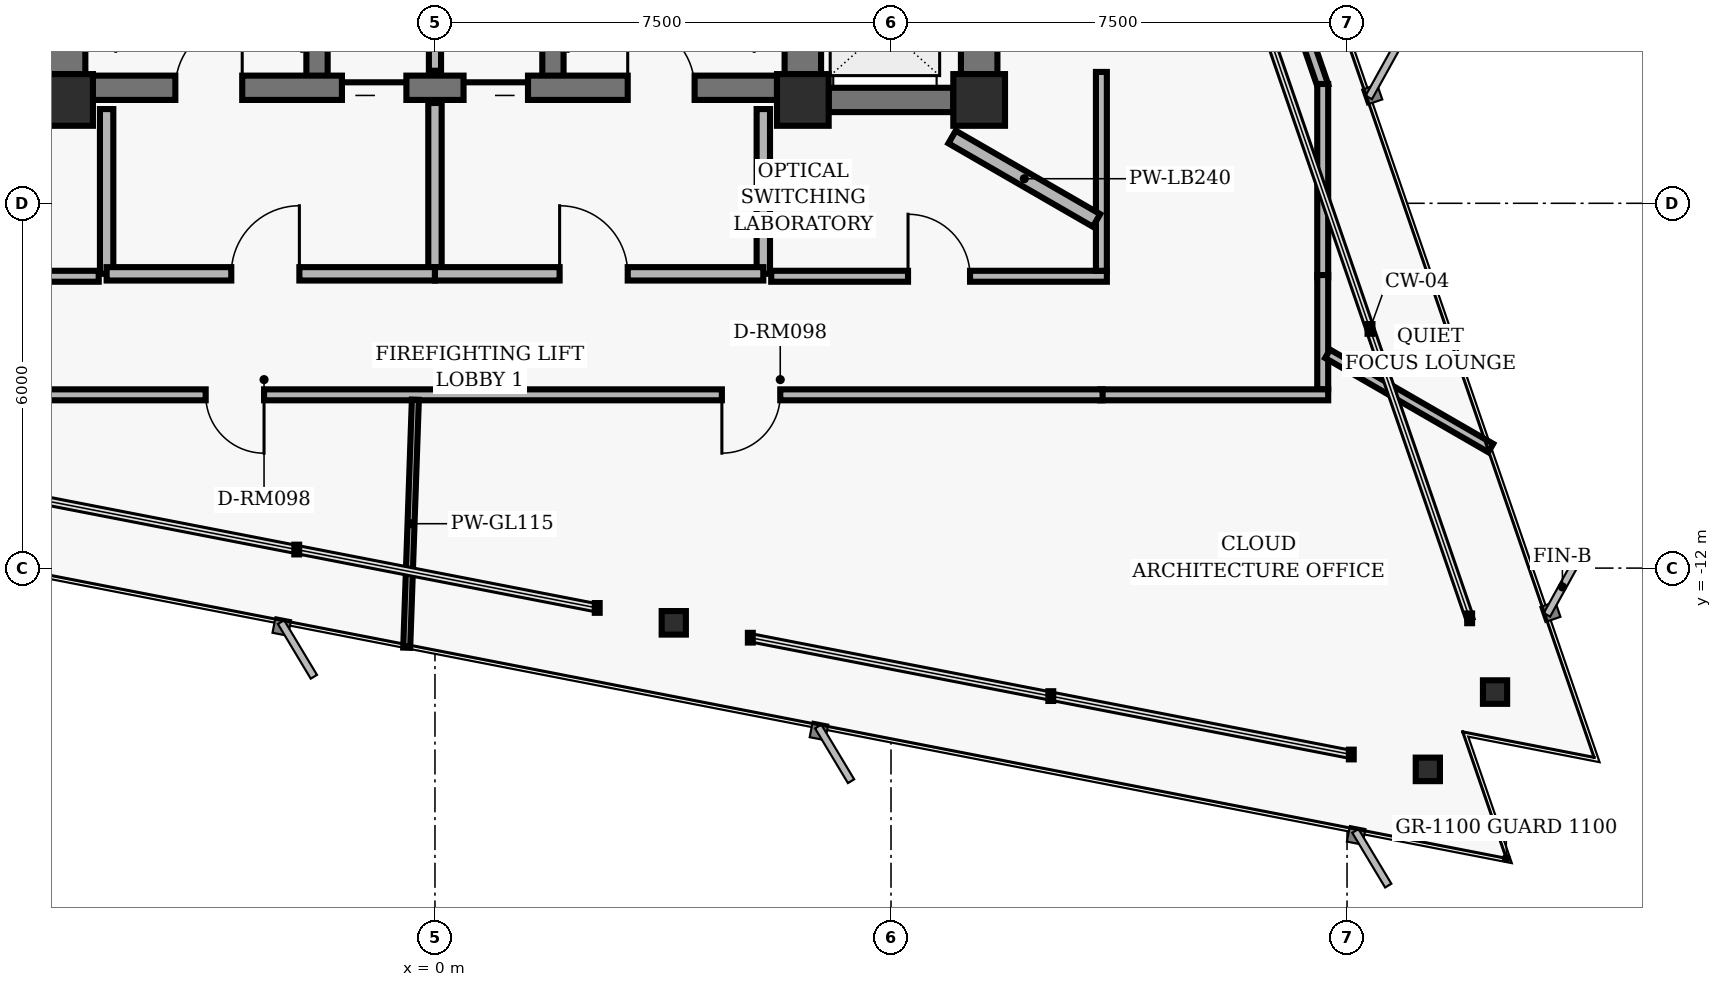
"""IFC4 building model, lengths in metres.
Left out: names, types, materials, properties, quantities, classifications, styles, units other than length and angle.
Written with IfcOpenShell. Run it as: python <this file> out.ifc"""

import sys

from ifc_helpers import new_model, si_unit, direction, frame, frame_2d, origin, origin_2d, place, context, subcontext, project, spatial, rectangle, hollow_rectangle, i_section, extrude, element, fill, save


model = new_model("IFC4")
c1 = context("Model", 3, precision=1e-05, world=origin(), true_north=direction((0.0, 1.0)))
c2 = subcontext(c1, "Body", "Model", "MODEL_VIEW")
j1 = project(units=[si_unit("LENGTHUNIT", "METRE"), si_unit("PLANEANGLEUNIT", "RADIAN")], contexts=[c1])
p1 = place(None, origin())
s1 = spatial("IfcSite", under=j1, at=p1, CompositionType="ELEMENT")
p2 = place(p1, origin())
s2 = spatial("IfcBuilding", under=s1, at=p2, CompositionType="ELEMENT")
p3 = place(p2, frame((0.0, 0.0, 162.4)))
s3 = spatial("IfcBuildingStorey", under=s2, at=p3, CompositionType="ELEMENT", Elevation=162.4)
for number, where, z_axis, x_axis in (
    (1, (-6.05, -4.3, 0.0), (0.0, 0.0, 1.0), (1.0, 0.0, 0.0)),
    (2, (6.05, -4.3, 0.0), (0.0, 0.0, 1.0), (1.0, 0.0, 0.0)),
    (3, (8.95, -4.3, 0.0), (0.0, 0.0, 1.0), (1.0, 0.0, 0.0)),
):
    element("IfcColumn", number, at=place(p3, frame(where, z_axis=z_axis, x_axis=x_axis)), inside=s3, PredefinedType="COLUMN", context=c2, shape_type="SweptSolid", body=[
        extrude(hollow_rectangle(XDim=0.85, YDim=0.85, WallThickness=0.055, InnerFilletRadius=0.02, OuterFilletRadius=0.04, at=origin_2d()), origin(), (0.0, 0.0, 1.0), 3.04),
    ])
for number, where, z_axis, x_axis in (
    (4, (-6.05, -3.875, 0.0), (0.0, 0.0, 1.0), (0.0, 1.0, 0.0)),
    (5, (6.05, -3.875, 0.0), (0.0, 0.0, 1.0), (0.0, 1.0, 0.0)),
):
    element("IfcWall", number, at=place(p3, frame(where, z_axis=z_axis, x_axis=x_axis)), inside=s3, PredefinedType="SHEAR", context=c2, shape_type="SweptSolid", body=[
        extrude(rectangle(XDim=3.45, YDim=0.6, at=frame_2d((1.725, 0.0))), origin(), (0.0, 0.0, 1.0), 2.788),
    ])
for number, where, z_axis, x_axis in (
    (6, (-1.94, -4.1, 0.0), (0.0, 0.0, 1.0), (0.0, 1.0, 0.0)),
    (7, (1.94, -4.1, 0.0), (0.0, 0.0, 1.0), (0.0, 1.0, 0.0)),
):
    element("IfcWall", number, at=place(p3, frame(where, z_axis=z_axis, x_axis=x_axis)), inside=s3, PredefinedType="SHEAR", context=c2, shape_type="SweptSolid", body=[
        extrude(rectangle(XDim=8.2, YDim=0.35, at=frame_2d((4.1, 0.0))), origin(), (0.0, 0.0, 1.0), 2.788),
    ])
p4 = place(p3, frame((-5.625, -4.1, 0.0), z_axis=(0.0, 0.0, 1.0), x_axis=(1.0, 0.0, 0.0)))
e8 = element("IfcWall", 8, at=p4, inside=s3, PredefinedType="SHEAR", context=c2, shape_type="SweptSolid", body=[
    extrude(rectangle(XDim=11.25, YDim=0.4, at=frame_2d((5.625, 0.0))), origin(), (0.0, 0.0, 1.0), 2.788),
])
p5 = place(p4, frame((1.355, 0.0, 0.0)))
e9 = element("IfcOpeningElement", 9, at=p5, cuts=e8, PredefinedType="OPENING", context=c2, shape_type="SweptSolid", body=[
    extrude(rectangle(XDim=1.1, YDim=2.04, at=frame_2d((0.55, 1.02))), frame((0.0, 0.21, 0.0), z_axis=(0.0, -1.0, 0.0), x_axis=(1.0, 0.0, 0.0)), (0.0, 0.0, 1.0), 0.42),
])
p6 = place(p4, frame((8.795, 0.0, 0.0)))
e10 = element("IfcOpeningElement", 10, at=p6, cuts=e8, PredefinedType="OPENING", context=c2, shape_type="SweptSolid", body=[
    extrude(rectangle(XDim=1.1, YDim=2.04, at=frame_2d((0.55, 1.02))), frame((0.0, 0.21, 0.0), z_axis=(0.0, -1.0, 0.0), x_axis=(1.0, 0.0, 0.0)), (0.0, 0.0, 1.0), 0.42),
])
p7 = place(p4, frame((4.095, 0.0, 0.0)))
e11 = element("IfcOpeningElement", 11, at=p7, cuts=e8, PredefinedType="OPENING", context=c2, shape_type="SweptSolid", body=[
    extrude(rectangle(XDim=1.06, YDim=2.04, at=frame_2d((0.53, 1.02))), frame((0.0, 0.21, 0.0), z_axis=(0.0, -1.0, 0.0), x_axis=(1.0, 0.0, 0.0)), (0.0, 0.0, 1.0), 0.42),
])
p8 = place(p4, frame((6.095, 0.0, 0.0)))
e12 = element("IfcOpeningElement", 12, at=p8, cuts=e8, PredefinedType="OPENING", context=c2, shape_type="SweptSolid", body=[
    extrude(rectangle(XDim=1.06, YDim=2.04, at=frame_2d((0.53, 1.02))), frame((0.0, 0.21, 0.0), z_axis=(0.0, -1.0, 0.0), x_axis=(1.0, 0.0, 0.0)), (0.0, 0.0, 1.0), 0.42),
])
p9 = place(p3, frame((8.95, -3.875, 0.0), z_axis=(0.0, 0.0, 1.0), x_axis=(0.0, 1.0, 0.0)))
e13 = element("IfcWall", 13, at=p9, inside=s3, PredefinedType="SHEAR", context=c2, shape_type="SweptSolid", body=[
    extrude(rectangle(XDim=7.95, YDim=0.6, at=frame_2d((3.975, 0.0))), origin(), (0.0, 0.0, 1.0), 2.788),
])
p10 = place(p9, frame((0.55, 0.0, 0.0)))
e14 = element("IfcOpeningElement", 14, at=p10, cuts=e13, PredefinedType="OPENING", context=c2, shape_type="SweptSolid", body=[
    extrude(rectangle(XDim=1.06, YDim=2.04, at=frame_2d((0.53, 1.02))), frame((0.0, 0.31, 0.0), z_axis=(0.0, -1.0, 0.0), x_axis=(1.0, 0.0, 0.0)), (0.0, 0.0, 1.0), 0.62),
])
p11 = place(p9, frame((3.445, 0.0, 0.0)))
e15 = element("IfcOpeningElement", 15, at=p11, cuts=e13, PredefinedType="OPENING", context=c2, shape_type="SweptSolid", body=[
    extrude(rectangle(XDim=1.06, YDim=2.04, at=frame_2d((0.53, 1.02))), frame((0.0, 0.31, 0.0), z_axis=(0.0, -1.0, 0.0), x_axis=(1.0, 0.0, 0.0)), (0.0, 0.0, 1.0), 0.62),
])
p12 = place(p9, frame((6.33, 0.0, 0.0)))
e16 = element("IfcOpeningElement", 16, at=p12, cuts=e13, PredefinedType="OPENING", context=c2, shape_type="SweptSolid", body=[
    extrude(rectangle(XDim=1.06, YDim=2.04, at=frame_2d((0.53, 1.02))), frame((0.0, 0.31, 0.0), z_axis=(0.0, -1.0, 0.0), x_axis=(1.0, 0.0, 0.0)), (0.0, 0.0, 1.0), 0.62),
])
p13 = place(p3, frame((6.475, -4.3, 0.0), z_axis=(0.0, 0.0, 1.0), x_axis=(1.0, 0.0, 0.0)))
e17 = element("IfcWall", 17, at=p13, inside=s3, PredefinedType="SHEAR", context=c2, shape_type="SweptSolid", body=[
    extrude(rectangle(XDim=2.05, YDim=0.4, at=frame_2d((1.025, 0.0))), origin(), (0.0, 0.0, 1.0), 2.788),
])
for number, where, z_axis, x_axis in (
    (18, (17.434, -14.039, 0.0), (0.0, 0.0, 1.0), (1.0, 0.0, 0.0)),
    (19, (3.927, -12.9, 0.0), (0.0, 0.0, 1.0), (1.0, 0.0, 0.0)),
    (20, (16.329, -15.311, 0.0), (0.0, 0.0, 1.0), (1.0, 0.0, 0.0)),
):
    element("IfcColumn", number, at=place(p3, frame(where, z_axis=z_axis, x_axis=x_axis)), inside=s3, PredefinedType="COLUMN", context=c2, shape_type="SweptSolid", body=[
        extrude(i_section(OverallWidth=0.398, OverallDepth=0.387, WebThickness=0.021, FlangeThickness=0.033, FilletRadius=0.018, at=origin_2d()), origin(), (0.0, 0.0, 1.0), 3.04),
    ])
p14 = place(p3, frame((0.0, -3.82, 0.0), z_axis=(0.0, 0.0, 1.0), x_axis=(0.0, 1.0, 0.0)))
e21 = element("IfcWall", 21, at=p14, inside=s3, PredefinedType="PARTITIONING", context=c2, shape_type="SweptSolid", body=[
    extrude(rectangle(XDim=2.67, YDim=0.2, at=frame_2d((1.335, 0.0))), origin(), (0.0, 0.0, 1.0), 2.763),
])
for number, where, z_axis, x_axis in (
    (22, (-5.4, -7.16, 0.0), (0.0, 0.0, 1.0), (0.0, 1.0, 0.0)),
    (23, (5.4, -7.16, 0.0), (0.0, 0.0, 1.0), (0.0, 1.0, 0.0)),
):
    element("IfcWall", number, at=place(p3, frame(where, z_axis=z_axis, x_axis=x_axis)), inside=s3, PredefinedType="PARTITIONING", context=c2, shape_type="SweptSolid", body=[
        extrude(rectangle(XDim=2.71, YDim=0.22, at=frame_2d((1.355, 0.0))), origin(), (0.0, 0.0, 1.0), 2.763),
    ])
p15 = place(p3, frame((0.0, -7.16, 0.0), z_axis=(0.0, 0.0, 1.0), x_axis=(0.0, 1.0, 0.0)))
e24 = element("IfcWall", 24, at=p15, inside=s3, PredefinedType="PARTITIONING", context=c2, shape_type="SweptSolid", body=[
    extrude(rectangle(XDim=2.81, YDim=0.22, at=frame_2d((1.405, 0.0))), origin(), (0.0, 0.0, 1.0), 2.763),
])
p16 = place(p3, frame((-5.4, -7.16, 0.0), z_axis=(0.0, 0.0, 1.0), x_axis=(1.0, 0.0, 0.0)))
e25 = element("IfcWall", 25, at=p16, inside=s3, PredefinedType="PARTITIONING", context=c2, shape_type="SweptSolid", body=[
    extrude(rectangle(XDim=5.4, YDim=0.22, at=frame_2d((2.7, 0.0))), origin(), (0.0, 0.0, 1.0), 2.33),
])
p17 = place(p16, frame((2.05, 0.0, 0.0)))
e26 = element("IfcOpeningElement", 26, at=p17, cuts=e25, PredefinedType="OPENING", context=c2, shape_type="SweptSolid", body=[
    extrude(rectangle(XDim=1.12, YDim=2.02, at=frame_2d((0.56, 1.01))), frame((0.0, 0.12, 0.0), z_axis=(0.0, -1.0, 0.0), x_axis=(1.0, 0.0, 0.0)), (0.0, 0.0, 1.0), 0.24),
])
p18 = place(p3, frame((0.0, -7.16, 0.0), z_axis=(0.0, 0.0, 1.0), x_axis=(1.0, 0.0, 0.0)))
e27 = element("IfcWall", 27, at=p18, inside=s3, PredefinedType="PARTITIONING", context=c2, shape_type="SweptSolid", body=[
    extrude(rectangle(XDim=5.4, YDim=0.22, at=frame_2d((2.7, 0.0))), origin(), (0.0, 0.0, 1.0), 2.33),
])
p19 = place(p18, frame((2.05, 0.0, 0.0)))
e28 = element("IfcOpeningElement", 28, at=p19, cuts=e27, PredefinedType="OPENING", context=c2, shape_type="SweptSolid", body=[
    extrude(rectangle(XDim=1.12, YDim=2.02, at=frame_2d((0.56, 1.01))), frame((0.0, 0.12, 0.0), z_axis=(0.0, -1.0, 0.0), x_axis=(1.0, 0.0, 0.0)), (0.0, 0.0, 1.0), 0.24),
])
p20 = place(p3, frame((-6.59, -7.2, 0.0), z_axis=(0.0, 0.0, 1.0), x_axis=(1.0, 0.0, 0.0)))
e29 = element("IfcWall", 29, at=p20, inside=s3, PredefinedType="PARTITIONING", context=c2, shape_type="SweptSolid", body=[
    extrude(rectangle(XDim=1.06, YDim=0.18, at=frame_2d((0.53, 0.0))), origin(), (0.0, 0.0, 1.0), 2.763),
])
p21 = place(p3, frame((5.53, -7.2, 0.0), z_axis=(0.0, 0.0, 1.0), x_axis=(1.0, 0.0, 0.0)))
e30 = element("IfcWall", 30, at=p21, inside=s3, PredefinedType="PARTITIONING", context=c2, shape_type="SweptSolid", body=[
    extrude(rectangle(XDim=5.52, YDim=0.18, at=frame_2d((2.76, 0.0))), origin(), (0.0, 0.0, 1.0), 2.33),
])
p22 = place(p21, frame((2.25, 0.0, 0.0)))
e31 = element("IfcOpeningElement", 31, at=p22, cuts=e30, PredefinedType="OPENING", context=c2, shape_type="SweptSolid", body=[
    extrude(rectangle(XDim=1.02, YDim=2.02, at=frame_2d((0.51, 1.01))), frame((0.0, 0.1, 0.0), z_axis=(0.0, -1.0, 0.0), x_axis=(1.0, 0.0, 0.0)), (0.0, 0.0, 1.0), 0.2),
])
p23 = place(p3, frame((10.96, -7.11, 0.0), z_axis=(0.0, 0.0, 1.0), x_axis=(0.0, 1.0, 0.0)))
e32 = element("IfcWall", 32, at=p23, inside=s3, PredefinedType="PARTITIONING", context=c2, shape_type="SweptSolid", body=[
    extrude(rectangle(XDim=3.271, YDim=0.18, at=frame_2d((1.635, 0.0))), origin(), (0.0, 0.0, 1.0), 2.763),
])
p24 = place(p3, frame((10.954, 6.533, 0.0), z_axis=(0.0, 0.0, 1.0), x_axis=(0.325553439946, -0.945523642084, 0.0)))
e33 = element("IfcWall", 33, at=p24, inside=s3, PredefinedType="PARTITIONING", context=c2, shape_type="SweptSolid", body=[
    extrude(rectangle(XDim=11.22, YDim=0.18, at=frame_2d((5.61, 0.0))), origin(), (0.0, 0.0, 1.0), 2.763),
])
p25 = place(p24, frame((5.311, 0.0, 0.0)))
e34 = element("IfcOpeningElement", 34, at=p25, cuts=e33, PredefinedType="OPENING", context=c2, shape_type="SweptSolid", body=[
    extrude(rectangle(XDim=0.96, YDim=2.02, at=frame_2d((0.48, 1.01))), frame((0.0, 0.1, 0.0), z_axis=(0.0, -1.0, 0.0), x_axis=(1.0, 0.0, 0.0)), (0.0, 0.0, 1.0), 0.2),
])
p26 = place(p3, frame((14.6, -4.038, 0.0), z_axis=(0.0, 0.0, 1.0), x_axis=(0.0, -1.0, 0.0)))
e35 = element("IfcWall", 35, at=p26, inside=s3, PredefinedType="PARTITIONING", context=c2, shape_type="SweptSolid", body=[
    extrude(rectangle(XDim=3.182, YDim=0.18, at=frame_2d((1.591, 0.0))), origin(), (0.0, 0.0, 1.0), 2.763),
])
p27 = place(p3, frame((14.6, -7.18, 0.0), z_axis=(0.0, 0.0, 1.0), x_axis=(0.0, -1.0, 0.0)))
e36 = element("IfcWall", 36, at=p27, inside=s3, PredefinedType="PARTITIONING", context=c2, shape_type="SweptSolid", body=[
    extrude(rectangle(XDim=1.88, YDim=0.18, at=frame_2d((0.94, 0.0))), origin(), (0.0, 0.0, 1.0), 2.763),
])
p28 = place(p3, frame((14.69, -9.15, 0.0), z_axis=(0.0, 0.0, 1.0), x_axis=(-1.0, 0.0, 0.0)))
e37 = element("IfcWall", 37, at=p28, inside=s3, PredefinedType="PARTITIONING", context=c2, shape_type="SweptSolid", body=[
    extrude(rectangle(XDim=3.75, YDim=0.18, at=frame_2d((1.875, 0.0))), origin(), (0.0, 0.0, 1.0), 2.763),
])
p29 = place(p3, frame((10.98, -9.15, 0.0), z_axis=(0.0, 0.0, 1.0), x_axis=(-1.0, 0.0, 0.0)))
e38 = element("IfcWall", 38, at=p29, inside=s3, PredefinedType="PARTITIONING", context=c2, shape_type="SweptSolid", body=[
    extrude(rectangle(XDim=17.5, YDim=0.18, at=frame_2d((8.75, 0.0))), origin(), (0.0, 0.0, 1.0), 2.33),
])
p30 = place(p29, frame((13.791, 0.0, 0.0)))
e39 = element("IfcOpeningElement", 39, at=p30, cuts=e38, PredefinedType="OPENING", context=c2, shape_type="SweptSolid", body=[
    extrude(rectangle(XDim=0.96, YDim=2.02, at=frame_2d((0.48, 1.01))), frame((0.0, 0.1, 0.0), z_axis=(0.0, -1.0, 0.0), x_axis=(1.0, 0.0, 0.0)), (0.0, 0.0, 1.0), 0.2),
])
p31 = place(p29, frame((5.302, 0.0, 0.0)))
e40 = element("IfcOpeningElement", 40, at=p31, cuts=e38, PredefinedType="OPENING", context=c2, shape_type="SweptSolid", body=[
    extrude(rectangle(XDim=0.96, YDim=2.02, at=frame_2d((0.48, 1.01))), frame((0.0, 0.1, 0.0), z_axis=(0.0, -1.0, 0.0), x_axis=(1.0, 0.0, 0.0)), (0.0, 0.0, 1.0), 0.2),
])
p32 = place(p3, frame((-0.322, -9.23, 0.0), z_axis=(0.0, 0.0, 1.0), x_axis=(-0.034927807623, -0.999389837978, 0.0)))
e41 = element("IfcWall", 41, at=p32, inside=s3, PredefinedType="MOVABLE", context=c2, shape_type="SweptSolid", body=[
    extrude(rectangle(XDim=4.082, YDim=0.115, at=frame_2d((2.041, 0.0))), origin(), (0.0, 0.0, 1.0), 2.763),
])
p33 = place(p3, frame((8.504, -4.91, 0.0), z_axis=(0.0, 0.0, 1.0), x_axis=(0.866010685746, -0.500025491523, 0.0)))
e42 = element("IfcWall", 42, at=p33, inside=s3, PredefinedType="PARTITIONING", context=c2, shape_type="SweptSolid", body=[
    extrude(rectangle(XDim=2.743, YDim=0.24, at=frame_2d((1.372, 0.0))), origin(), (0.0, 0.0, 1.0), 2.763),
])
p34 = place(p3, frame((14.68, -8.476, 0.0), z_axis=(0.0, 0.0, 1.0), x_axis=(0.866047813034, -0.499961184032, 0.0)))
e43 = element("IfcWall", 43, at=p34, inside=s3, PredefinedType="PARTITIONING", context=c2, shape_type="SweptSolid", body=[
    extrude(rectangle(XDim=3.098, YDim=0.16, at=frame_2d((1.549, 0.0))), origin(), (0.0, 0.0, 1.0), 2.763),
])
p35 = place(p5, origin())
e44 = element("IfcDoor", 44, at=p35, inside=s3, OperationType="SINGLE_SWING_RIGHT", PredefinedType="DOOR", context=c2, shape_type="SweptSolid", body=[
    extrude(rectangle(XDim=1.1, YDim=2.04, at=frame_2d((0.55, 1.02))), frame((0.0, 0.025, 0.0), z_axis=(0.0, -1.0, 0.0), x_axis=(1.0, 0.0, 0.0)), (0.0, 0.0, 1.0), 0.05),
])
fill(e9, e44)
p36 = place(p6, origin())
e45 = element("IfcDoor", 45, at=p36, inside=s3, OperationType="SINGLE_SWING_LEFT", PredefinedType="DOOR", context=c2, shape_type="SweptSolid", body=[
    extrude(rectangle(XDim=1.1, YDim=2.04, at=frame_2d((0.55, 1.02))), frame((0.0, 0.025, 0.0), z_axis=(0.0, -1.0, 0.0), x_axis=(1.0, 0.0, 0.0)), (0.0, 0.0, 1.0), 0.05),
])
fill(e10, e45)
p37 = place(p7, origin())
e46 = element("IfcDoor", 46, at=p37, inside=s3, OperationType="SLIDING_TO_LEFT", PredefinedType="DOOR", context=c2, shape_type="SweptSolid", body=[
    extrude(rectangle(XDim=1.06, YDim=2.04, at=frame_2d((0.53, 1.02))), frame((0.0, 0.025, 0.0), z_axis=(0.0, -1.0, 0.0), x_axis=(1.0, 0.0, 0.0)), (0.0, 0.0, 1.0), 0.05),
])
fill(e11, e46)
p38 = place(p8, origin())
e47 = element("IfcDoor", 47, at=p38, inside=s3, OperationType="SLIDING_TO_RIGHT", PredefinedType="DOOR", context=c2, shape_type="SweptSolid", body=[
    extrude(rectangle(XDim=1.06, YDim=2.04, at=frame_2d((0.53, 1.02))), frame((0.0, 0.025, 0.0), z_axis=(0.0, -1.0, 0.0), x_axis=(1.0, 0.0, 0.0)), (0.0, 0.0, 1.0), 0.05),
])
fill(e12, e47)
p39 = place(p17, origin())
e48 = element("IfcDoor", 48, at=p39, inside=s3, OperationType="SINGLE_SWING_RIGHT", PredefinedType="DOOR", context=c2, shape_type="SweptSolid", body=[
    extrude(rectangle(XDim=1.12, YDim=2.02, at=frame_2d((0.56, 1.01))), frame((0.0, 0.025, 0.0), z_axis=(0.0, -1.0, 0.0), x_axis=(1.0, 0.0, 0.0)), (0.0, 0.0, 1.0), 0.05),
])
fill(e26, e48)
p40 = place(p19, origin())
e49 = element("IfcDoor", 49, at=p40, inside=s3, OperationType="SINGLE_SWING_LEFT", PredefinedType="DOOR", context=c2, shape_type="SweptSolid", body=[
    extrude(rectangle(XDim=1.12, YDim=2.02, at=frame_2d((0.56, 1.01))), frame((0.0, 0.025, 0.0), z_axis=(0.0, -1.0, 0.0), x_axis=(1.0, 0.0, 0.0)), (0.0, 0.0, 1.0), 0.05),
])
fill(e28, e49)
p41 = place(p30, origin())
e50 = element("IfcDoor", 50, at=p41, inside=s3, OperationType="SINGLE_SWING_LEFT", PredefinedType="DOOR", context=c2, shape_type="SweptSolid", body=[
    extrude(rectangle(XDim=0.96, YDim=2.02, at=frame_2d((0.48, 1.01))), frame((0.0, 0.025, 0.0), z_axis=(0.0, -1.0, 0.0), x_axis=(1.0, 0.0, 0.0)), (0.0, 0.0, 1.0), 0.05),
])
fill(e39, e50)
p42 = place(p31, origin())
e51 = element("IfcDoor", 51, at=p42, inside=s3, OperationType="SINGLE_SWING_RIGHT", PredefinedType="DOOR", context=c2, shape_type="SweptSolid", body=[
    extrude(rectangle(XDim=0.96, YDim=2.02, at=frame_2d((0.48, 1.01))), frame((0.0, 0.025, 0.0), z_axis=(0.0, -1.0, 0.0), x_axis=(1.0, 0.0, 0.0)), (0.0, 0.0, 1.0), 0.05),
])
fill(e40, e51)
p43 = place(p22, origin())
e52 = element("IfcDoor", 52, at=p43, inside=s3, OperationType="SINGLE_SWING_LEFT", PredefinedType="DOOR", context=c2, shape_type="SweptSolid", body=[
    extrude(rectangle(XDim=1.02, YDim=2.02, at=frame_2d((0.51, 1.01))), frame((0.0, 0.025, 0.0), z_axis=(0.0, -1.0, 0.0), x_axis=(1.0, 0.0, 0.0)), (0.0, 0.0, 1.0), 0.05),
])
fill(e31, e52)
save(model, sys.argv[1])
